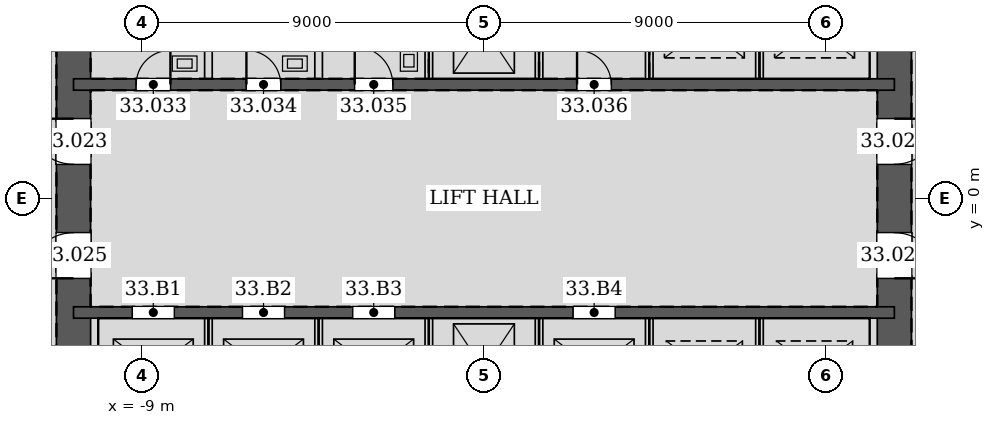
"""IFC4 building model, lengths in metres.
Left out: names, types, materials, properties, quantities, classifications, styles, units other than length and angle.
Written with IfcOpenShell. Run it as: python <this file> out.ifc"""

import sys

from ifc_helpers import new_model, si_unit, direction, frame, frame_2d, origin, place, context, subcontext, project, spatial, rectangle, extrude, element, fill, save


model = new_model("IFC4")
c1 = context("Model", 3, precision=1e-05, world=origin(), true_north=direction((0.0, 1.0)))
c2 = subcontext(c1, "Body", "Model", "MODEL_VIEW")
j1 = project(units=[si_unit("LENGTHUNIT", "METRE"), si_unit("PLANEANGLEUNIT", "RADIAN")], contexts=[c1])
p1 = place(None, origin())
s1 = spatial("IfcSite", under=j1, at=p1, CompositionType="ELEMENT")
p2 = place(p1, origin())
s2 = spatial("IfcBuilding", under=s1, at=p2, CompositionType="ELEMENT")
p3 = place(p2, frame((0.0, 0.0, 147.0)))
s3 = spatial("IfcBuildingStorey", under=s2, at=p3, CompositionType="ELEMENT", Elevation=147.0)
p4 = place(p3, frame((10.8, -10.8, 0.0), z_axis=(0.0, 0.0, 1.0), x_axis=(0.0, 1.0, 0.0)))
e1 = element("IfcWall", 1, at=p4, inside=s3, PredefinedType="SOLIDWALL", context=c2, shape_type="SweptSolid", body=[
    extrude(rectangle(XDim=21.6, YDim=0.9, at=frame_2d((10.8, 0.0))), origin(), (0.0, 0.0, 1.0), 4.2),
])
p5 = place(p4, frame((11.7, 0.0, 0.0)))
e2 = element("IfcOpeningElement", 2, at=p5, cuts=e1, PredefinedType="OPENING", context=c2, shape_type="SweptSolid", body=[
    extrude(rectangle(XDim=1.2, YDim=2.1, at=frame_2d((0.6, 1.05))), frame((0.0, 0.46, 0.0), z_axis=(0.0, -1.0, 0.0), x_axis=(1.0, 0.0, 0.0)), (0.0, 0.0, 1.0), 0.92),
])
p6 = place(p4, frame((8.7, 0.0, 0.0)))
e3 = element("IfcOpeningElement", 3, at=p6, cuts=e1, PredefinedType="OPENING", context=c2, shape_type="SweptSolid", body=[
    extrude(rectangle(XDim=1.2, YDim=2.1, at=frame_2d((0.6, 1.05))), frame((0.0, 0.46, 0.0), z_axis=(0.0, -1.0, 0.0), x_axis=(1.0, 0.0, 0.0)), (0.0, 0.0, 1.0), 0.92),
])
p7 = place(p3, frame((-10.8, 10.8, 0.0), z_axis=(0.0, 0.0, 1.0), x_axis=(0.0, -1.0, 0.0)))
e4 = element("IfcWall", 4, at=p7, inside=s3, PredefinedType="SOLIDWALL", context=c2, shape_type="SweptSolid", body=[
    extrude(rectangle(XDim=21.6, YDim=0.9, at=frame_2d((10.8, 0.0))), origin(), (0.0, 0.0, 1.0), 4.2),
])
p8 = place(p7, frame((8.7, 0.0, 0.0)))
e5 = element("IfcOpeningElement", 5, at=p8, cuts=e4, PredefinedType="OPENING", context=c2, shape_type="SweptSolid", body=[
    extrude(rectangle(XDim=1.2, YDim=2.1, at=frame_2d((0.6, 1.05))), frame((0.0, 0.46, 0.0), z_axis=(0.0, -1.0, 0.0), x_axis=(1.0, 0.0, 0.0)), (0.0, 0.0, 1.0), 0.92),
])
p9 = place(p7, frame((11.7, 0.0, 0.0)))
e6 = element("IfcOpeningElement", 6, at=p9, cuts=e4, PredefinedType="OPENING", context=c2, shape_type="SweptSolid", body=[
    extrude(rectangle(XDim=1.2, YDim=2.1, at=frame_2d((0.6, 1.05))), frame((0.0, 0.46, 0.0), z_axis=(0.0, -1.0, 0.0), x_axis=(1.0, 0.0, 0.0)), (0.0, 0.0, 1.0), 0.92),
])
p10 = place(p3, frame((-10.8, 3.0, 0.0), z_axis=(0.0, 0.0, 1.0), x_axis=(1.0, 0.0, 0.0)))
e7 = element("IfcWall", 7, at=p10, inside=s3, PredefinedType="SOLIDWALL", context=c2, shape_type="SweptSolid", body=[
    extrude(rectangle(XDim=21.6, YDim=0.3, at=frame_2d((10.8, 0.0))), origin(), (0.0, 0.0, 1.0), 4.2),
])
p11 = place(p10, frame((1.65, 0.0, 0.0)))
e8 = element("IfcOpeningElement", 8, at=p11, cuts=e7, PredefinedType="OPENING", context=c2, shape_type="SweptSolid", body=[
    extrude(rectangle(XDim=0.9, YDim=2.1, at=frame_2d((0.45, 1.05))), frame((0.0, 0.16, 0.0), z_axis=(0.0, -1.0, 0.0), x_axis=(1.0, 0.0, 0.0)), (0.0, 0.0, 1.0), 0.32),
])
p12 = place(p10, frame((4.55, 0.0, 0.0)))
e9 = element("IfcOpeningElement", 9, at=p12, cuts=e7, PredefinedType="OPENING", context=c2, shape_type="SweptSolid", body=[
    extrude(rectangle(XDim=0.9, YDim=2.1, at=frame_2d((0.45, 1.05))), frame((0.0, 0.16, 0.0), z_axis=(0.0, -1.0, 0.0), x_axis=(1.0, 0.0, 0.0)), (0.0, 0.0, 1.0), 0.32),
])
p13 = place(p10, frame((7.4, 0.0, 0.0)))
e10 = element("IfcOpeningElement", 10, at=p13, cuts=e7, PredefinedType="OPENING", context=c2, shape_type="SweptSolid", body=[
    extrude(rectangle(XDim=1.0, YDim=2.1, at=frame_2d((0.5, 1.05))), frame((0.0, 0.16, 0.0), z_axis=(0.0, -1.0, 0.0), x_axis=(1.0, 0.0, 0.0)), (0.0, 0.0, 1.0), 0.32),
])
p14 = place(p10, frame((13.25, 0.0, 0.0)))
e11 = element("IfcOpeningElement", 11, at=p14, cuts=e7, PredefinedType="OPENING", context=c2, shape_type="SweptSolid", body=[
    extrude(rectangle(XDim=0.9, YDim=2.1, at=frame_2d((0.45, 1.05))), frame((0.0, 0.16, 0.0), z_axis=(0.0, -1.0, 0.0), x_axis=(1.0, 0.0, 0.0)), (0.0, 0.0, 1.0), 0.32),
])
p15 = place(p3, frame((-10.8, -3.0, 0.0), z_axis=(0.0, 0.0, 1.0), x_axis=(1.0, 0.0, 0.0)))
e12 = element("IfcWall", 12, at=p15, inside=s3, PredefinedType="SOLIDWALL", context=c2, shape_type="SweptSolid", body=[
    extrude(rectangle(XDim=21.6, YDim=0.3, at=frame_2d((10.8, 0.0))), origin(), (0.0, 0.0, 1.0), 4.2),
])
p16 = place(p15, frame((1.55, 0.0, 0.0)))
e13 = element("IfcOpeningElement", 13, at=p16, cuts=e12, PredefinedType="OPENING", context=c2, shape_type="SweptSolid", body=[
    extrude(rectangle(XDim=1.1, YDim=2.1, at=frame_2d((0.55, 1.05))), frame((0.0, 0.16, 0.0), z_axis=(0.0, -1.0, 0.0), x_axis=(1.0, 0.0, 0.0)), (0.0, 0.0, 1.0), 0.32),
])
p17 = place(p15, frame((4.45, 0.0, 0.0)))
e14 = element("IfcOpeningElement", 14, at=p17, cuts=e12, PredefinedType="OPENING", context=c2, shape_type="SweptSolid", body=[
    extrude(rectangle(XDim=1.1, YDim=2.1, at=frame_2d((0.55, 1.05))), frame((0.0, 0.16, 0.0), z_axis=(0.0, -1.0, 0.0), x_axis=(1.0, 0.0, 0.0)), (0.0, 0.0, 1.0), 0.32),
])
p18 = place(p15, frame((7.35, 0.0, 0.0)))
e15 = element("IfcOpeningElement", 15, at=p18, cuts=e12, PredefinedType="OPENING", context=c2, shape_type="SweptSolid", body=[
    extrude(rectangle(XDim=1.1, YDim=2.1, at=frame_2d((0.55, 1.05))), frame((0.0, 0.16, 0.0), z_axis=(0.0, -1.0, 0.0), x_axis=(1.0, 0.0, 0.0)), (0.0, 0.0, 1.0), 0.32),
])
p19 = place(p15, frame((13.15, 0.0, 0.0)))
e16 = element("IfcOpeningElement", 16, at=p19, cuts=e12, PredefinedType="OPENING", context=c2, shape_type="SweptSolid", body=[
    extrude(rectangle(XDim=1.1, YDim=2.1, at=frame_2d((0.55, 1.05))), frame((0.0, 0.16, 0.0), z_axis=(0.0, -1.0, 0.0), x_axis=(1.0, 0.0, 0.0)), (0.0, 0.0, 1.0), 0.32),
])
for number, where, z_axis, x_axis in (
    (17, (-7.25, 3.15, 0.0), (0.0, 0.0, 1.0), (0.0, 1.0, 0.0)),
    (18, (-4.35, 3.15, 0.0), (0.0, 0.0, 1.0), (0.0, 1.0, 0.0)),
    (19, (-1.45, 3.15, 0.0), (0.0, 0.0, 1.0), (0.0, 1.0, 0.0)),
    (20, (1.45, 3.15, 0.0), (0.0, 0.0, 1.0), (0.0, 1.0, 0.0)),
    (21, (4.35, 3.15, 0.0), (0.0, 0.0, 1.0), (0.0, 1.0, 0.0)),
):
    element("IfcWall", number, at=place(p3, frame(where, z_axis=z_axis, x_axis=x_axis)), inside=s3, PredefinedType="PARTITIONING", context=c2, shape_type="SweptSolid", body=[
        extrude(rectangle(XDim=2.7, YDim=0.2, at=frame_2d((1.35, 0.0))), origin(), (0.0, 0.0, 1.0), 4.035),
    ])
for number, where, z_axis, x_axis in (
    (22, (7.25, 3.15, 0.0), (0.0, 0.0, 1.0), (0.0, 1.0, 0.0)),
    (23, (-7.25, -5.85, 0.0), (0.0, 0.0, 1.0), (0.0, 1.0, 0.0)),
    (24, (-4.35, -5.85, 0.0), (0.0, 0.0, 1.0), (0.0, 1.0, 0.0)),
    (25, (-1.45, -5.85, 0.0), (0.0, 0.0, 1.0), (0.0, 1.0, 0.0)),
    (26, (1.45, -5.85, 0.0), (0.0, 0.0, 1.0), (0.0, 1.0, 0.0)),
    (27, (4.35, -5.85, 0.0), (0.0, 0.0, 1.0), (0.0, 1.0, 0.0)),
    (28, (7.25, -5.85, 0.0), (0.0, 0.0, 1.0), (0.0, 1.0, 0.0)),
):
    element("IfcWall", number, at=place(p3, frame(where, z_axis=z_axis, x_axis=x_axis)), inside=s3, PredefinedType="PARTITIONING", context=c2, shape_type="SweptSolid", body=[
        extrude(rectangle(XDim=2.7, YDim=0.2, at=frame_2d((1.35, 0.0))), origin(), (0.0, 0.0, 1.0), 4.2),
    ])
p20 = place(p5, frame((1.2, 0.0, 0.0), z_axis=(0.0, 0.0, 1.0), x_axis=(-1.0, 0.0, 0.0)))
e29 = element("IfcDoor", 29, at=p20, inside=s3, OperationType="SINGLE_SWING_LEFT", PredefinedType="DOOR", context=c2, shape_type="SweptSolid", body=[
    extrude(rectangle(XDim=1.2, YDim=2.1, at=frame_2d((0.6, 1.05))), frame((0.0, 0.025, 0.0), z_axis=(0.0, -1.0, 0.0), x_axis=(1.0, 0.0, 0.0)), (0.0, 0.0, 1.0), 0.05),
])
fill(e2, e29)
p21 = place(p8, frame((1.2, 0.0, 0.0), z_axis=(0.0, 0.0, 1.0), x_axis=(-1.0, 0.0, 0.0)))
e30 = element("IfcDoor", 30, at=p21, inside=s3, OperationType="SINGLE_SWING_RIGHT", PredefinedType="DOOR", context=c2, shape_type="SweptSolid", body=[
    extrude(rectangle(XDim=1.2, YDim=2.1, at=frame_2d((0.6, 1.05))), frame((0.0, 0.025, 0.0), z_axis=(0.0, -1.0, 0.0), x_axis=(1.0, 0.0, 0.0)), (0.0, 0.0, 1.0), 0.05),
])
fill(e5, e30)
p22 = place(p6, frame((1.2, 0.0, 0.0), z_axis=(0.0, 0.0, 1.0), x_axis=(-1.0, 0.0, 0.0)))
e31 = element("IfcDoor", 31, at=p22, inside=s3, OperationType="SINGLE_SWING_RIGHT", PredefinedType="DOOR", context=c2, shape_type="SweptSolid", body=[
    extrude(rectangle(XDim=1.2, YDim=2.1, at=frame_2d((0.6, 1.05))), frame((0.0, 0.025, 0.0), z_axis=(0.0, -1.0, 0.0), x_axis=(1.0, 0.0, 0.0)), (0.0, 0.0, 1.0), 0.05),
])
fill(e3, e31)
p23 = place(p9, frame((1.2, 0.0, 0.0), z_axis=(0.0, 0.0, 1.0), x_axis=(-1.0, 0.0, 0.0)))
e32 = element("IfcDoor", 32, at=p23, inside=s3, OperationType="SINGLE_SWING_LEFT", PredefinedType="DOOR", context=c2, shape_type="SweptSolid", body=[
    extrude(rectangle(XDim=1.2, YDim=2.1, at=frame_2d((0.6, 1.05))), frame((0.0, 0.025, 0.0), z_axis=(0.0, -1.0, 0.0), x_axis=(1.0, 0.0, 0.0)), (0.0, 0.0, 1.0), 0.05),
])
fill(e6, e32)
p24 = place(p11, origin())
e33 = element("IfcDoor", 33, at=p24, inside=s3, OperationType="SINGLE_SWING_RIGHT", PredefinedType="DOOR", context=c2, shape_type="SweptSolid", body=[
    extrude(rectangle(XDim=0.9, YDim=2.1, at=frame_2d((0.45, 1.05))), frame((0.0, 0.025, 0.0), z_axis=(0.0, -1.0, 0.0), x_axis=(1.0, 0.0, 0.0)), (0.0, 0.0, 1.0), 0.05),
])
fill(e8, e33)
p25 = place(p12, origin())
e34 = element("IfcDoor", 34, at=p25, inside=s3, OperationType="SINGLE_SWING_LEFT", PredefinedType="DOOR", context=c2, shape_type="SweptSolid", body=[
    extrude(rectangle(XDim=0.9, YDim=2.1, at=frame_2d((0.45, 1.05))), frame((0.0, 0.025, 0.0), z_axis=(0.0, -1.0, 0.0), x_axis=(1.0, 0.0, 0.0)), (0.0, 0.0, 1.0), 0.05),
])
fill(e9, e34)
p26 = place(p13, origin())
e35 = element("IfcDoor", 35, at=p26, inside=s3, OperationType="SINGLE_SWING_LEFT", PredefinedType="DOOR", context=c2, shape_type="SweptSolid", body=[
    extrude(rectangle(XDim=1.0, YDim=2.1, at=frame_2d((0.5, 1.05))), frame((0.0, 0.025, 0.0), z_axis=(0.0, -1.0, 0.0), x_axis=(1.0, 0.0, 0.0)), (0.0, 0.0, 1.0), 0.05),
])
fill(e10, e35)
p27 = place(p14, origin())
e36 = element("IfcDoor", 36, at=p27, inside=s3, OperationType="SINGLE_SWING_LEFT", PredefinedType="DOOR", context=c2, shape_type="SweptSolid", body=[
    extrude(rectangle(XDim=0.9, YDim=2.1, at=frame_2d((0.45, 1.05))), frame((0.0, 0.025, 0.0), z_axis=(0.0, -1.0, 0.0), x_axis=(1.0, 0.0, 0.0)), (0.0, 0.0, 1.0), 0.05),
])
fill(e11, e36)
p28 = place(p16, origin())
e37 = element("IfcDoor", 37, at=p28, inside=s3, OperationType="DOUBLE_DOOR_SLIDING", PredefinedType="DOOR", context=c2, shape_type="SweptSolid", body=[
    extrude(rectangle(XDim=1.1, YDim=2.1, at=frame_2d((0.55, 1.05))), frame((0.0, 0.025, 0.0), z_axis=(0.0, -1.0, 0.0), x_axis=(1.0, 0.0, 0.0)), (0.0, 0.0, 1.0), 0.05),
])
fill(e13, e37)
p29 = place(p17, origin())
e38 = element("IfcDoor", 38, at=p29, inside=s3, OperationType="DOUBLE_DOOR_SLIDING", PredefinedType="DOOR", context=c2, shape_type="SweptSolid", body=[
    extrude(rectangle(XDim=1.1, YDim=2.1, at=frame_2d((0.55, 1.05))), frame((0.0, 0.025, 0.0), z_axis=(0.0, -1.0, 0.0), x_axis=(1.0, 0.0, 0.0)), (0.0, 0.0, 1.0), 0.05),
])
fill(e14, e38)
p30 = place(p18, origin())
e39 = element("IfcDoor", 39, at=p30, inside=s3, OperationType="DOUBLE_DOOR_SLIDING", PredefinedType="DOOR", context=c2, shape_type="SweptSolid", body=[
    extrude(rectangle(XDim=1.1, YDim=2.1, at=frame_2d((0.55, 1.05))), frame((0.0, 0.025, 0.0), z_axis=(0.0, -1.0, 0.0), x_axis=(1.0, 0.0, 0.0)), (0.0, 0.0, 1.0), 0.05),
])
fill(e15, e39)
p31 = place(p19, origin())
e40 = element("IfcDoor", 40, at=p31, inside=s3, OperationType="DOUBLE_DOOR_SLIDING", PredefinedType="DOOR", context=c2, shape_type="SweptSolid", body=[
    extrude(rectangle(XDim=1.1, YDim=2.1, at=frame_2d((0.55, 1.05))), frame((0.0, 0.025, 0.0), z_axis=(0.0, -1.0, 0.0), x_axis=(1.0, 0.0, 0.0)), (0.0, 0.0, 1.0), 0.05),
])
fill(e16, e40)
save(model, sys.argv[1])
